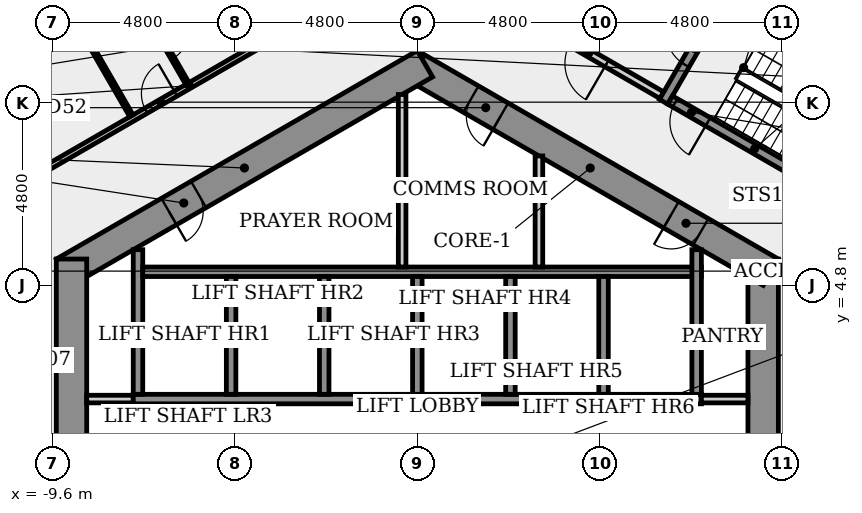
"""IFC4 building model, lengths in metres.
Left out: names, types, materials, properties, quantities, classifications, styles, units other than length and angle.
Written with IfcOpenShell. Run it as: python <this file> out.ifc"""

import sys

from ifc_helpers import new_model, si_unit, direction, frame, frame_2d, origin, place, context, subcontext, project, spatial, rectangle, extrude, element, fill, save


model = new_model("IFC4")
c1 = context("Model", 3, precision=1e-05, world=origin(), true_north=direction((0.0, 1.0)))
c2 = subcontext(c1, "Body", "Model", "MODEL_VIEW")
j1 = project(units=[si_unit("LENGTHUNIT", "METRE"), si_unit("PLANEANGLEUNIT", "RADIAN")], contexts=[c1])
p1 = place(None, origin())
s1 = spatial("IfcSite", under=j1, at=p1, CompositionType="ELEMENT")
p2 = place(p1, origin())
s2 = spatial("IfcBuilding", under=s1, at=p2, CompositionType="ELEMENT")
p3 = place(p2, frame((0.0, 0.0, 66.3)))
s3 = spatial("IfcBuildingStorey", under=s2, at=p3, CompositionType="ELEMENT", Elevation=66.3)
p4 = place(p3, frame((9.1, -5.485, 0.0), z_axis=(0.0, 0.0, 1.0), x_axis=(0.0, 1.0, 0.0)))
e1 = element("IfcWall", 1, at=p4, inside=s3, PredefinedType="SHEAR", context=c2, shape_type="SweptSolid", body=[
    extrude(rectangle(XDim=10.97, YDim=0.8, at=frame_2d((5.485, 0.0))), origin(), (0.0, 0.0, 1.0), 4.0),
])
p5 = place(p4, frame((4.685, 0.0, 0.0)))
e2 = element("IfcOpeningElement", 2, at=p5, cuts=e1, PredefinedType="OPENING", context=c2, shape_type="SweptSolid", body=[
    extrude(rectangle(XDim=1.6, YDim=2.1, at=frame_2d((0.8, 1.05))), frame((0.0, 0.41, 0.0), z_axis=(0.0, -1.0, 0.0), x_axis=(1.0, 0.0, 0.0)), (0.0, 0.0, 1.0), 0.82),
])
p6 = place(p3, frame((9.3, 5.138, 0.0), z_axis=(0.0, 0.0, 1.0), x_axis=(-0.866023993627, 0.500002442456, 0.0)))
e3 = element("IfcWall", 3, at=p6, inside=s3, PredefinedType="SHEAR", context=c2, shape_type="SweptSolid", body=[
    extrude(rectangle(XDim=10.97, YDim=0.8, at=frame_2d((5.485, 0.0))), origin(), (0.0, 0.0, 1.0), 4.0),
])
p7 = place(p6, frame((8.21, 0.0, 0.0)))
e4 = element("IfcOpeningElement", 4, at=p7, cuts=e3, PredefinedType="OPENING", context=c2, shape_type="SweptSolid", body=[
    extrude(rectangle(XDim=0.9, YDim=2.1, at=frame_2d((0.45, 1.05))), frame((0.0, 0.41, 0.0), z_axis=(0.0, -1.0, 0.0), x_axis=(1.0, 0.0, 0.0)), (0.0, 0.0, 1.0), 0.82),
])
p8 = place(p6, frame((2.126, 0.0, 0.0)))
e5 = element("IfcOpeningElement", 5, at=p8, cuts=e3, PredefinedType="OPENING", context=c2, shape_type="SweptSolid", body=[
    extrude(rectangle(XDim=0.9, YDim=2.1, at=frame_2d((0.45, 1.05))), frame((0.0, 0.41, 0.0), z_axis=(0.0, -1.0, 0.0), x_axis=(1.0, 0.0, 0.0)), (0.0, 0.0, 1.0), 0.82),
])
p9 = place(p3, frame((0.2, 10.623, 0.0), z_axis=(0.0, 0.0, 1.0), x_axis=(-0.866023993627, -0.500002442456, 0.0)))
e6 = element("IfcWall", 6, at=p9, inside=s3, PredefinedType="SHEAR", context=c2, shape_type="SweptSolid", body=[
    extrude(rectangle(XDim=10.97, YDim=0.8, at=frame_2d((5.485, 0.0))), origin(), (0.0, 0.0, 1.0), 4.0),
])
p10 = place(p9, frame((6.877, 0.0, 0.0)))
e7 = element("IfcOpeningElement", 7, at=p10, cuts=e6, PredefinedType="OPENING", context=c2, shape_type="SweptSolid", body=[
    extrude(rectangle(XDim=0.9, YDim=2.1, at=frame_2d((0.45, 1.05))), frame((0.0, 0.41, 0.0), z_axis=(0.0, -1.0, 0.0), x_axis=(1.0, 0.0, 0.0)), (0.0, 0.0, 1.0), 0.82),
])
p11 = place(p3, frame((-9.1, 5.485, 0.0), z_axis=(0.0, 0.0, 1.0), x_axis=(0.0, -1.0, 0.0)))
e8 = element("IfcWall", 8, at=p11, inside=s3, PredefinedType="SHEAR", context=c2, shape_type="SweptSolid", body=[
    extrude(rectangle(XDim=10.97, YDim=0.8, at=frame_2d((5.485, 0.0))), origin(), (0.0, 0.0, 1.0), 4.0),
])
p12 = place(p11, frame((4.685, 0.0, 0.0)))
e9 = element("IfcOpeningElement", 9, at=p12, cuts=e8, PredefinedType="OPENING", context=c2, shape_type="SweptSolid", body=[
    extrude(rectangle(XDim=1.6, YDim=2.1, at=frame_2d((0.8, 1.05))), frame((0.0, 0.41, 0.0), z_axis=(0.0, -1.0, 0.0), x_axis=(1.0, 0.0, 0.0)), (0.0, 0.0, 1.0), 0.82),
])
p13 = place(p3, frame((-10.693, 7.336, 0.0), z_axis=(0.0, 0.0, 1.0), x_axis=(0.866018601944, 0.500011780947, 0.0)))
e10 = element("IfcWall", 10, at=p13, inside=s3, PredefinedType="PARTITIONING", context=c2, shape_type="SweptSolid", body=[
    extrude(rectangle(XDim=10.835, YDim=0.15, at=frame_2d((5.417, 0.0))), origin(), (0.0, 0.0, 1.0), 3.6),
])
p14 = place(p13, frame((4.103, 0.0, 0.0)))
e11 = element("IfcOpeningElement", 11, at=p14, cuts=e10, PredefinedType="OPENING", context=c2, shape_type="SweptSolid", body=[
    extrude(rectangle(XDim=0.9, YDim=2.1, at=frame_2d((0.45, 1.05))), frame((0.0, 0.085, 0.0), z_axis=(0.0, -1.0, 0.0), x_axis=(1.0, 0.0, 0.0)), (0.0, 0.0, 1.0), 0.17),
])
p15 = place(p3, frame((-8.7, 1.8, 0.0), z_axis=(0.0, 0.0, 1.0), x_axis=(1.0, 0.0, 0.0)))
e12 = element("IfcWall", 12, at=p15, inside=s3, PredefinedType="PARTITIONING", context=c2, shape_type="SweptSolid", body=[
    extrude(rectangle(XDim=1.225, YDim=0.2, at=frame_2d((0.613, 0.0))), origin(), (0.0, 0.0, 1.0), 3.6),
])
p16 = place(p3, frame((-7.523, 9.253, 0.0), z_axis=(0.0, 0.0, 1.0), x_axis=(-0.500009404554, 0.866019973994, 0.0)))
e13 = element("IfcWall", 13, at=p16, inside=s3, PredefinedType="PARTITIONING", context=c2, shape_type="SweptSolid", body=[
    extrude(rectangle(XDim=9.01, YDim=0.1, at=frame_2d((4.505, 0.0))), origin(), (0.0, 0.0, 1.0), 3.6),
])
p17 = place(p3, frame((-7.475, 1.8, 0.0), z_axis=(0.0, 0.0, 1.0), x_axis=(1.0, 0.0, 0.0)))
e14 = element("IfcWall", 14, at=p17, inside=s3, PredefinedType="SHEAR", context=c2, shape_type="SweptSolid", body=[
    extrude(rectangle(XDim=14.95, YDim=0.25, at=frame_2d((7.475, 0.0))), origin(), (0.0, 0.0, 1.0), 3.6),
])
p18 = place(p3, frame((-7.35, 1.925, 0.0), z_axis=(0.0, 0.0, 1.0), x_axis=(0.0, 1.0, 0.0)))
e15 = element("IfcWall", 15, at=p18, inside=s3, PredefinedType="SHEAR", context=c2, shape_type="SweptSolid", body=[
    extrude(rectangle(XDim=3.805, YDim=0.25, at=frame_2d((1.903, 0.0))), origin(), (0.0, 0.0, 1.0), 3.6),
])
p19 = place(p3, frame((-7.225, 5.15, 0.0), z_axis=(0.0, 0.0, 1.0), x_axis=(1.0, 0.0, 0.0)))
e16 = element("IfcWall", 16, at=p19, inside=s3, PredefinedType="SHEAR", context=c2, shape_type="SweptSolid", body=[
    extrude(rectangle(XDim=14.7, YDim=0.25, at=frame_2d((7.35, 0.0))), origin(), (0.0, 0.0, 1.0), 3.6),
])
p20 = place(p3, frame((-7.239, 12.16, 0.0), z_axis=(0.0, 0.0, 1.0), x_axis=(0.499986429846, -0.866033238375, 0.0)))
e17 = element("IfcWall", 17, at=p20, inside=s3, PredefinedType="PARTITIONING", context=c2, shape_type="SweptSolid", body=[
    extrude(rectangle(XDim=2.375, YDim=0.1, at=frame_2d((1.188, 0.0))), origin(), (0.0, 0.0, 1.0), 3.6),
])
p21 = place(p20, frame((0.812, 0.0, 0.0)))
e18 = element("IfcOpeningElement", 18, at=p21, cuts=e17, PredefinedType="OPENING", context=c2, shape_type="SweptSolid", body=[
    extrude(rectangle(XDim=0.8, YDim=2.1, at=frame_2d((0.4, 1.05))), frame((0.0, 0.06, 0.0), z_axis=(0.0, -1.0, 0.0), x_axis=(1.0, 0.0, 0.0)), (0.0, 0.0, 1.0), 0.12),
])
for number, where, z_axis, x_axis in (
    (19, (-4.9, 5.025, 0.0), (0.0, 0.0, 1.0), (0.0, -1.0, 0.0)),
    (20, (-2.45, 5.025, 0.0), (0.0, 0.0, 1.0), (0.0, -1.0, 0.0)),
):
    element("IfcWall", number, at=place(p3, frame(where, z_axis=z_axis, x_axis=x_axis)), inside=s3, PredefinedType="SHEAR", context=c2, shape_type="SweptSolid", body=[
        extrude(rectangle(XDim=3.1, YDim=0.25, at=frame_2d((1.55, 0.0))), origin(), (0.0, 0.0, 1.0), 4.0),
    ])
p22 = place(p3, frame((-0.4, 9.815, 0.0), z_axis=(0.0, 0.0, 1.0), x_axis=(0.0, -1.0, 0.0)))
e21 = element("IfcWall", 21, at=p22, inside=s3, PredefinedType="PARTITIONING", context=c2, shape_type="SweptSolid", body=[
    extrude(rectangle(XDim=4.54, YDim=0.2, at=frame_2d((2.27, 0.0))), origin(), (0.0, 0.0, 1.0), 3.6),
])
for number, where, z_axis, x_axis in (
    (22, (0.0, 5.025, 0.0), (0.0, 0.0, 1.0), (0.0, -1.0, 0.0)),
    (23, (2.45, 5.025, 0.0), (0.0, 0.0, 1.0), (0.0, -1.0, 0.0)),
):
    element("IfcWall", number, at=place(p3, frame(where, z_axis=z_axis, x_axis=x_axis)), inside=s3, PredefinedType="SHEAR", context=c2, shape_type="SweptSolid", body=[
        extrude(rectangle(XDim=3.1, YDim=0.25, at=frame_2d((1.55, 0.0))), origin(), (0.0, 0.0, 1.0), 4.0),
    ])
p23 = place(p3, frame((3.2, 8.198, 0.0), z_axis=(0.0, 0.0, 1.0), x_axis=(0.0, -1.0, 0.0)))
e24 = element("IfcWall", 24, at=p23, inside=s3, PredefinedType="PARTITIONING", context=c2, shape_type="SweptSolid", body=[
    extrude(rectangle(XDim=2.924, YDim=0.2, at=frame_2d((1.462, 0.0))), origin(), (0.0, 0.0, 1.0), 3.6),
])
p24 = place(p3, frame((4.9, 5.025, 0.0), z_axis=(0.0, 0.0, 1.0), x_axis=(0.0, -1.0, 0.0)))
e25 = element("IfcWall", 25, at=p24, inside=s3, PredefinedType="SHEAR", context=c2, shape_type="SweptSolid", body=[
    extrude(rectangle(XDim=3.1, YDim=0.25, at=frame_2d((1.55, 0.0))), origin(), (0.0, 0.0, 1.0), 4.0),
])
p25 = place(p3, frame((6.435, 9.795, 0.0), z_axis=(0.0, 0.0, 1.0), x_axis=(-0.866012907634, 0.500021643343, 0.0)))
e26 = element("IfcWall", 26, at=p25, inside=s3, PredefinedType="PARTITIONING", context=c2, shape_type="SweptSolid", body=[
    extrude(rectangle(XDim=4.45, YDim=0.2, at=frame_2d((2.225, 0.0))), origin(), (0.0, 0.0, 1.0), 3.6),
])
p26 = place(p25, frame((1.675, 0.0, 0.0)))
e27 = element("IfcOpeningElement", 27, at=p26, cuts=e26, PredefinedType="OPENING", context=c2, shape_type="SweptSolid", body=[
    extrude(rectangle(XDim=1.1, YDim=2.1, at=frame_2d((0.55, 1.05))), frame((0.0, 0.11, 0.0), z_axis=(0.0, -1.0, 0.0), x_axis=(1.0, 0.0, 0.0)), (0.0, 0.0, 1.0), 0.22),
])
p27 = place(p3, frame((6.48, 9.624, 0.0), z_axis=(0.0, 0.0, 1.0), x_axis=(0.500017246033, 0.866015446554, 0.0)))
e28 = element("IfcWall", 28, at=p27, inside=s3, PredefinedType="SHEAR", context=c2, shape_type="SweptSolid", body=[
    extrude(rectangle(XDim=3.25, YDim=0.25, at=frame_2d((1.625, 0.0))), origin(), (0.0, 0.0, 1.0), 3.6),
])
p28 = place(p27, frame((1.125, 0.0, 0.0)))
e29 = element("IfcOpeningElement", 29, at=p28, cuts=e28, PredefinedType="OPENING", context=c2, shape_type="SweptSolid", body=[
    extrude(rectangle(XDim=1.0, YDim=2.1, at=frame_2d((0.5, 1.05))), frame((0.0, 0.135, 0.0), z_axis=(0.0, -1.0, 0.0), x_axis=(1.0, 0.0, 0.0)), (0.0, 0.0, 1.0), 0.27),
])
p29 = place(p3, frame((7.475, 1.8, 0.0), z_axis=(0.0, 0.0, 1.0), x_axis=(1.0, 0.0, 0.0)))
e30 = element("IfcWall", 30, at=p29, inside=s3, PredefinedType="PARTITIONING", context=c2, shape_type="SweptSolid", body=[
    extrude(rectangle(XDim=1.225, YDim=0.2, at=frame_2d((0.613, 0.0))), origin(), (0.0, 0.0, 1.0), 3.6),
])
p30 = place(p3, frame((7.35, 5.73, 0.0), z_axis=(0.0, 0.0, 1.0), x_axis=(0.0, -1.0, 0.0)))
e31 = element("IfcWall", 31, at=p30, inside=s3, PredefinedType="SHEAR", context=c2, shape_type="SweptSolid", body=[
    extrude(rectangle(XDim=3.805, YDim=0.25, at=frame_2d((1.903, 0.0))), origin(), (0.0, 0.0, 1.0), 3.6),
])
p31 = place(p3, frame((8.151, 12.268, 0.0), z_axis=(0.0, 0.0, 1.0), x_axis=(0.866025499775, -0.499999833739, 0.0)))
e32 = element("IfcWall", 32, at=p31, inside=s3, PredefinedType="SHEAR", context=c2, shape_type="SweptSolid", body=[
    extrude(rectangle(XDim=6.4, YDim=0.25, at=frame_2d((3.2, 0.0))), origin(), (0.0, 0.0, 1.0), 3.6),
])
p32 = place(p3, frame((11.1, 7.101, 0.0), z_axis=(0.0, 0.0, 1.0), x_axis=(-0.8660265141, 0.499998076872, 0.0)))
e33 = element("IfcWall", 33, at=p32, inside=s3, PredefinedType="SHEAR", context=c2, shape_type="SweptSolid", body=[
    extrude(rectangle(XDim=5.137, YDim=0.25, at=frame_2d((2.569, 0.0))), origin(), (0.0, 0.0, 1.0), 3.6),
])
p33 = place(p32, frame((3.987, 0.0, 0.0)))
e34 = element("IfcOpeningElement", 34, at=p33, cuts=e33, PredefinedType="OPENING", context=c2, shape_type="SweptSolid", body=[
    extrude(rectangle(XDim=1.0, YDim=2.1, at=frame_2d((0.5, 1.05))), frame((0.0, 0.135, 0.0), z_axis=(0.0, -1.0, 0.0), x_axis=(1.0, 0.0, 0.0)), (0.0, 0.0, 1.0), 0.27),
])
p34 = place(p33, origin())
e35 = element("IfcDoor", 35, at=p34, inside=s3, OperationType="SINGLE_SWING_LEFT", PredefinedType="DOOR", context=c2, shape_type="SweptSolid", body=[
    extrude(rectangle(XDim=1.0, YDim=2.1, at=frame_2d((0.5, 1.05))), frame((0.0, 0.025, 0.0), z_axis=(0.0, -1.0, 0.0), x_axis=(1.0, 0.0, 0.0)), (0.0, 0.0, 1.0), 0.05),
])
fill(e34, e35)
p35 = place(p28, origin())
e36 = element("IfcDoor", 36, at=p35, inside=s3, OperationType="SINGLE_SWING_RIGHT", PredefinedType="DOOR", context=c2, shape_type="SweptSolid", body=[
    extrude(rectangle(XDim=1.0, YDim=2.1, at=frame_2d((0.5, 1.05))), frame((0.0, 0.025, 0.0), z_axis=(0.0, -1.0, 0.0), x_axis=(1.0, 0.0, 0.0)), (0.0, 0.0, 1.0), 0.05),
])
fill(e29, e36)
p36 = place(p26, origin())
e37 = element("IfcDoor", 37, at=p36, inside=s3, OperationType="SINGLE_SWING_LEFT", PredefinedType="DOOR", context=c2, shape_type="SweptSolid", body=[
    extrude(rectangle(XDim=1.1, YDim=2.1, at=frame_2d((0.55, 1.05))), frame((0.0, 0.025, 0.0), z_axis=(0.0, -1.0, 0.0), x_axis=(1.0, 0.0, 0.0)), (0.0, 0.0, 1.0), 0.05),
])
fill(e27, e37)
p37 = place(p14, origin())
e38 = element("IfcDoor", 38, at=p37, inside=s3, OperationType="SINGLE_SWING_RIGHT", PredefinedType="DOOR", context=c2, shape_type="SweptSolid", body=[
    extrude(rectangle(XDim=0.9, YDim=2.1, at=frame_2d((0.45, 1.05))), frame((0.0, 0.025, 0.0), z_axis=(0.0, -1.0, 0.0), x_axis=(1.0, 0.0, 0.0)), (0.0, 0.0, 1.0), 0.05),
])
fill(e11, e38)
p38 = place(p21, origin())
e39 = element("IfcDoor", 39, at=p38, inside=s3, OperationType="SINGLE_SWING_LEFT", PredefinedType="DOOR", context=c2, shape_type="SweptSolid", body=[
    extrude(rectangle(XDim=0.8, YDim=2.1, at=frame_2d((0.4, 1.05))), frame((0.0, 0.025, 0.0), z_axis=(0.0, -1.0, 0.0), x_axis=(1.0, 0.0, 0.0)), (0.0, 0.0, 1.0), 0.05),
])
fill(e18, e39)
p39 = place(p10, origin())
e40 = element("IfcDoor", 40, at=p39, inside=s3, OperationType="SINGLE_SWING_RIGHT", PredefinedType="DOOR", context=c2, shape_type="SweptSolid", body=[
    extrude(rectangle(XDim=0.9, YDim=2.1, at=frame_2d((0.45, 1.05))), frame((0.0, 0.025, 0.0), z_axis=(0.0, -1.0, 0.0), x_axis=(1.0, 0.0, 0.0)), (0.0, 0.0, 1.0), 0.05),
])
fill(e7, e40)
p40 = place(p7, origin())
e41 = element("IfcDoor", 41, at=p40, inside=s3, OperationType="SINGLE_SWING_LEFT", PredefinedType="DOOR", context=c2, shape_type="SweptSolid", body=[
    extrude(rectangle(XDim=0.9, YDim=2.1, at=frame_2d((0.45, 1.05))), frame((0.0, 0.025, 0.0), z_axis=(0.0, -1.0, 0.0), x_axis=(1.0, 0.0, 0.0)), (0.0, 0.0, 1.0), 0.05),
])
fill(e4, e41)
p41 = place(p8, origin())
e42 = element("IfcDoor", 42, at=p41, inside=s3, OperationType="SINGLE_SWING_RIGHT", PredefinedType="DOOR", context=c2, shape_type="SweptSolid", body=[
    extrude(rectangle(XDim=0.9, YDim=2.1, at=frame_2d((0.45, 1.05))), frame((0.0, 0.025, 0.0), z_axis=(0.0, -1.0, 0.0), x_axis=(1.0, 0.0, 0.0)), (0.0, 0.0, 1.0), 0.05),
])
fill(e5, e42)
save(model, sys.argv[1])
